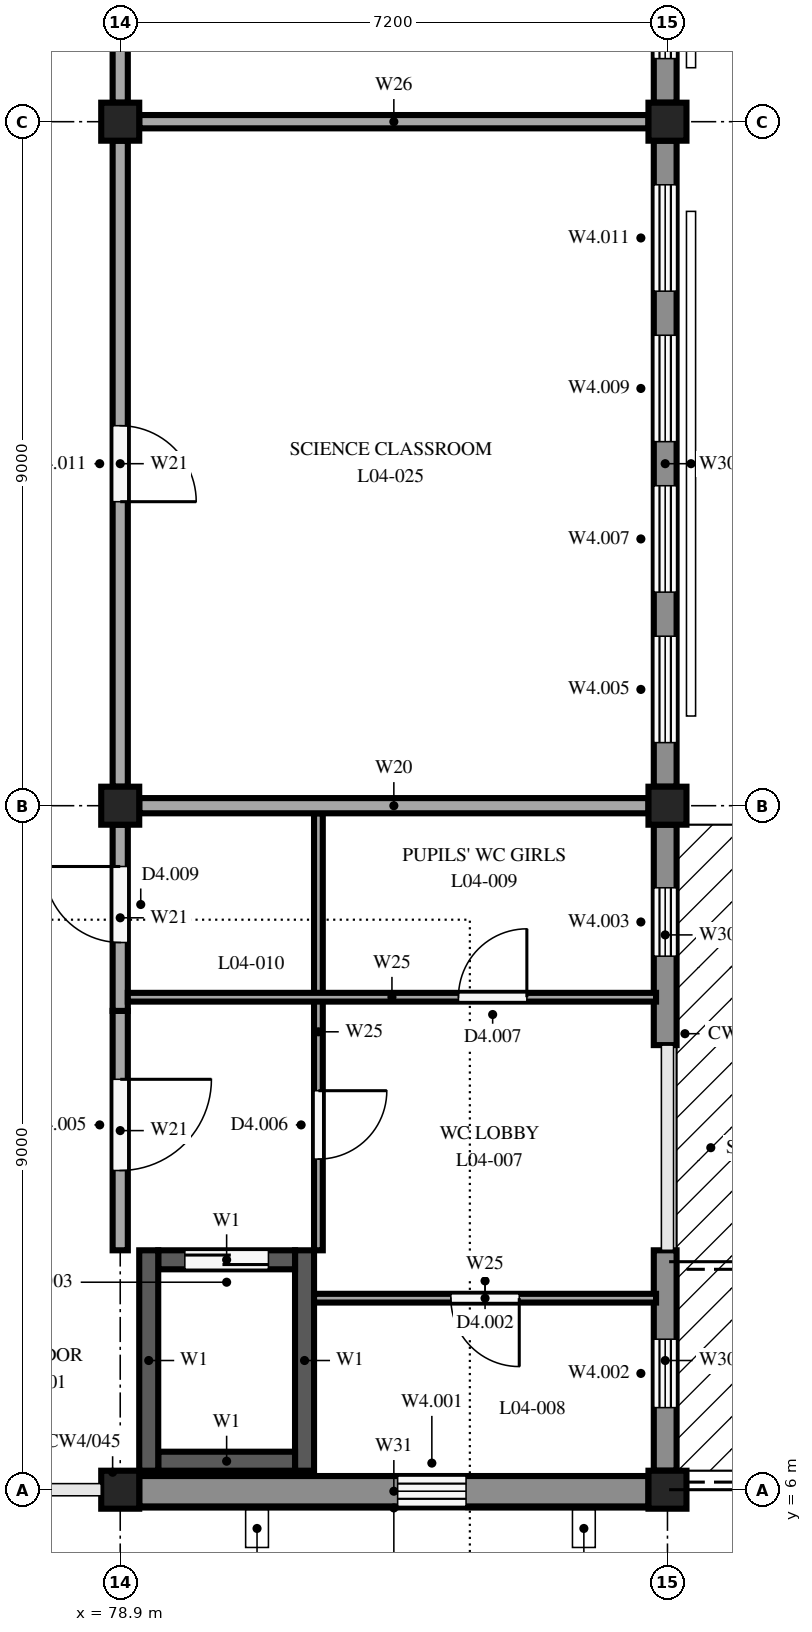
"""IFC4 building model, lengths in metres.
Left out: names, types, materials, properties, quantities, classifications, styles, units other than length and angle.
Written with IfcOpenShell. Run it as: python <this file> out.ifc"""

import sys

from ifc_helpers import new_model, si_unit, direction, frame, frame_2d, origin, origin_2d, place, context, subcontext, project, spatial, rectangle, extrude, element, fill, save


model = new_model("IFC4")
c1 = context("Model", 3, precision=1e-05, world=origin(), true_north=direction((0.0, 1.0)))
c2 = subcontext(c1, "Body", "Model", "MODEL_VIEW")
j1 = project(units=[si_unit("LENGTHUNIT", "METRE"), si_unit("PLANEANGLEUNIT", "RADIAN")], contexts=[c1])
p1 = place(None, origin())
s1 = spatial("IfcSite", under=j1, at=p1, CompositionType="ELEMENT")
p2 = place(p1, origin())
s2 = spatial("IfcBuilding", under=s1, at=p2, CompositionType="ELEMENT")
p3 = place(p2, frame((0.0, 0.0, 15.3)))
s3 = spatial("IfcBuildingStorey", under=s2, at=p3, CompositionType="ELEMENT", Elevation=15.3)
for number, where, z_axis, x_axis in (
    (1, (78.9, 6.0, 0.0), (0.0, 0.0, 1.0), (1.0, 0.0, 0.0)),
    (2, (78.9, 15.0, 0.0), (0.0, 0.0, 1.0), (1.0, 0.0, 0.0)),
    (3, (78.9, 24.0, 0.0), (0.0, 0.0, 1.0), (1.0, 0.0, 0.0)),
    (4, (86.1, 6.0, 0.0), (0.0, 0.0, 1.0), (1.0, 0.0, 0.0)),
    (5, (86.1, 15.0, 0.0), (0.0, 0.0, 1.0), (1.0, 0.0, 0.0)),
    (6, (86.1, 24.0, 0.0), (0.0, 0.0, 1.0), (1.0, 0.0, 0.0)),
):
    element("IfcColumn", number, at=place(p3, frame(where, z_axis=z_axis, x_axis=x_axis)), inside=s3, PredefinedType="COLUMN", context=c2, shape_type="SweptSolid", body=[
        extrude(rectangle(XDim=0.5, YDim=0.5, at=origin_2d()), origin(), (0.0, 0.0, 1.0), 3.3),
    ])
for number, where, z_axis, x_axis in (
    (7, (79.275, 6.25, 0.0), (0.0, 0.0, 1.0), (0.0, 1.0, 0.0)),
    (8, (81.325, 6.25, 0.0), (0.0, 0.0, 1.0), (0.0, 1.0, 0.0)),
):
    element("IfcWall", number, at=place(p3, frame(where, z_axis=z_axis, x_axis=x_axis)), inside=s3, PredefinedType="SHEAR", context=c2, shape_type="SweptSolid", body=[
        extrude(rectangle(XDim=2.9, YDim=0.25, at=frame_2d((1.45, 0.0))), origin(), (0.0, 0.0, 1.0), 3.3),
    ])
p4 = place(p3, frame((79.4, 6.375, 0.0), z_axis=(0.0, 0.0, 1.0), x_axis=(1.0, 0.0, 0.0)))
e9 = element("IfcWall", 9, at=p4, inside=s3, PredefinedType="SHEAR", context=c2, shape_type="SweptSolid", body=[
    extrude(rectangle(XDim=1.8, YDim=0.25, at=frame_2d((0.9, 0.0))), origin(), (0.0, 0.0, 1.0), 3.3),
])
p5 = place(p3, frame((79.4, 9.025, 0.0), z_axis=(0.0, 0.0, 1.0), x_axis=(1.0, 0.0, 0.0)))
e10 = element("IfcWall", 10, at=p5, inside=s3, PredefinedType="SHEAR", context=c2, shape_type="SweptSolid", body=[
    extrude(rectangle(XDim=1.8, YDim=0.25, at=frame_2d((0.9, 0.0))), origin(), (0.0, 0.0, 1.0), 3.3),
])
p6 = place(p5, frame((0.35, 0.0, 0.0)))
e11 = element("IfcOpeningElement", 11, at=p6, cuts=e10, PredefinedType="OPENING", context=c2, shape_type="SweptSolid", body=[
    extrude(rectangle(XDim=1.1, YDim=2.1, at=frame_2d((0.55, 1.05))), frame((0.0, 0.135, 0.0), z_axis=(0.0, -1.0, 0.0), x_axis=(1.0, 0.0, 0.0)), (0.0, 0.0, 1.0), 0.27),
])
p7 = place(p3, frame((86.07, 9.15, 0.0), z_axis=(0.0, 0.0, 1.0), x_axis=(0.0, -1.0, 0.0)))
e12 = element("IfcWall", 12, at=p7, inside=s3, PredefinedType="STANDARD", context=c2, shape_type="SweptSolid", body=[
    extrude(rectangle(XDim=2.9, YDim=0.3, at=frame_2d((1.45, 0.0))), origin(), (0.0, 0.0, 1.0), 2.75),
])
p8 = place(p7, frame((1.17, 0.0, 1.6)))
e13 = element("IfcOpeningElement", 13, at=p8, cuts=e12, PredefinedType="OPENING", context=c2, shape_type="SweptSolid", body=[
    extrude(rectangle(XDim=0.9, YDim=1.0, at=frame_2d((0.45, 0.5))), frame((0.0, 0.16, 0.0), z_axis=(0.0, -1.0, 0.0), x_axis=(1.0, 0.0, 0.0)), (0.0, 0.0, 1.0), 0.32),
])
p9 = place(p3, frame((86.07, 14.75, 0.0), z_axis=(0.0, 0.0, 1.0), x_axis=(0.0, -1.0, 0.0)))
e14 = element("IfcWall", 14, at=p9, inside=s3, PredefinedType="STANDARD", context=c2, shape_type="SweptSolid", body=[
    extrude(rectangle(XDim=2.9, YDim=0.3, at=frame_2d((1.45, 0.0))), origin(), (0.0, 0.0, 1.0), 2.75),
])
p10 = place(p9, frame((0.83, 0.0, 1.6)))
e15 = element("IfcOpeningElement", 15, at=p10, cuts=e14, PredefinedType="OPENING", context=c2, shape_type="SweptSolid", body=[
    extrude(rectangle(XDim=0.9, YDim=1.0, at=frame_2d((0.45, 0.5))), frame((0.0, 0.16, 0.0), z_axis=(0.0, -1.0, 0.0), x_axis=(1.0, 0.0, 0.0)), (0.0, 0.0, 1.0), 0.32),
])
p11 = place(p3, frame((86.07, 23.75, 0.0), z_axis=(0.0, 0.0, 1.0), x_axis=(0.0, -1.0, 0.0)))
e16 = element("IfcWall", 16, at=p11, inside=s3, PredefinedType="STANDARD", context=c2, shape_type="SweptSolid", body=[
    extrude(rectangle(XDim=8.5, YDim=0.3, at=frame_2d((4.25, 0.0))), origin(), (0.0, 0.0, 1.0), 2.75),
])
p12 = place(p11, frame((6.52, 0.0, 0.6)))
e17 = element("IfcOpeningElement", 17, at=p12, cuts=e16, PredefinedType="OPENING", context=c2, shape_type="SweptSolid", body=[
    extrude(rectangle(XDim=1.4, YDim=2.1, at=frame_2d((0.7, 1.05))), frame((0.0, 0.16, 0.0), z_axis=(0.0, -1.0, 0.0), x_axis=(1.0, 0.0, 0.0)), (0.0, 0.0, 1.0), 0.32),
])
p13 = place(p11, frame((4.54, 0.0, 0.6)))
e18 = element("IfcOpeningElement", 18, at=p13, cuts=e16, PredefinedType="OPENING", context=c2, shape_type="SweptSolid", body=[
    extrude(rectangle(XDim=1.4, YDim=2.1, at=frame_2d((0.7, 1.05))), frame((0.0, 0.16, 0.0), z_axis=(0.0, -1.0, 0.0), x_axis=(1.0, 0.0, 0.0)), (0.0, 0.0, 1.0), 0.32),
])
p14 = place(p11, frame((2.56, 0.0, 0.6)))
e19 = element("IfcOpeningElement", 19, at=p14, cuts=e16, PredefinedType="OPENING", context=c2, shape_type="SweptSolid", body=[
    extrude(rectangle(XDim=1.4, YDim=2.1, at=frame_2d((0.7, 1.05))), frame((0.0, 0.16, 0.0), z_axis=(0.0, -1.0, 0.0), x_axis=(1.0, 0.0, 0.0)), (0.0, 0.0, 1.0), 0.32),
])
p15 = place(p11, frame((0.58, 0.0, 0.6)))
e20 = element("IfcOpeningElement", 20, at=p15, cuts=e16, PredefinedType="OPENING", context=c2, shape_type="SweptSolid", body=[
    extrude(rectangle(XDim=1.4, YDim=2.1, at=frame_2d((0.7, 1.05))), frame((0.0, 0.16, 0.0), z_axis=(0.0, -1.0, 0.0), x_axis=(1.0, 0.0, 0.0)), (0.0, 0.0, 1.0), 0.32),
])
p16 = place(p3, frame((86.07, 32.75, 0.0), z_axis=(0.0, 0.0, 1.0), x_axis=(0.0, -1.0, 0.0)))
e21 = element("IfcWall", 21, at=p16, inside=s3, PredefinedType="STANDARD", context=c2, shape_type="SweptSolid", body=[
    extrude(rectangle(XDim=8.5, YDim=0.3, at=frame_2d((4.25, 0.0))), origin(), (0.0, 0.0, 1.0), 2.75),
])
p17 = place(p16, frame((6.52, 0.0, 0.6)))
e22 = element("IfcOpeningElement", 22, at=p17, cuts=e21, PredefinedType="OPENING", context=c2, shape_type="SweptSolid", body=[
    extrude(rectangle(XDim=1.4, YDim=2.1, at=frame_2d((0.7, 1.05))), frame((0.0, 0.16, 0.0), z_axis=(0.0, -1.0, 0.0), x_axis=(1.0, 0.0, 0.0)), (0.0, 0.0, 1.0), 0.32),
])
p18 = place(p16, frame((4.54, 0.0, 0.6)))
e23 = element("IfcOpeningElement", 23, at=p18, cuts=e21, PredefinedType="OPENING", context=c2, shape_type="SweptSolid", body=[
    extrude(rectangle(XDim=1.4, YDim=2.1, at=frame_2d((0.7, 1.05))), frame((0.0, 0.16, 0.0), z_axis=(0.0, -1.0, 0.0), x_axis=(1.0, 0.0, 0.0)), (0.0, 0.0, 1.0), 0.32),
])
p19 = place(p16, frame((2.56, 0.0, 0.6)))
e24 = element("IfcOpeningElement", 24, at=p19, cuts=e21, PredefinedType="OPENING", context=c2, shape_type="SweptSolid", body=[
    extrude(rectangle(XDim=1.4, YDim=2.1, at=frame_2d((0.7, 1.05))), frame((0.0, 0.16, 0.0), z_axis=(0.0, -1.0, 0.0), x_axis=(1.0, 0.0, 0.0)), (0.0, 0.0, 1.0), 0.32),
])
p20 = place(p16, frame((0.58, 0.0, 0.6)))
e25 = element("IfcOpeningElement", 25, at=p20, cuts=e21, PredefinedType="OPENING", context=c2, shape_type="SweptSolid", body=[
    extrude(rectangle(XDim=1.4, YDim=2.1, at=frame_2d((0.7, 1.05))), frame((0.0, 0.16, 0.0), z_axis=(0.0, -1.0, 0.0), x_axis=(1.0, 0.0, 0.0)), (0.0, 0.0, 1.0), 0.32),
])
p21 = place(p3, frame((85.85, 5.98, 0.0), z_axis=(0.0, 0.0, 1.0), x_axis=(-1.0, 0.0, 0.0)))
e26 = element("IfcWall", 26, at=p21, inside=s3, PredefinedType="STANDARD", context=c2, shape_type="SweptSolid", body=[
    extrude(rectangle(XDim=6.7, YDim=0.4, at=frame_2d((3.35, 0.0))), origin(), (0.0, 0.0, 1.0), 2.8),
])
p22 = place(p21, frame((2.4, 0.0, 1.6)))
e27 = element("IfcOpeningElement", 27, at=p22, cuts=e26, PredefinedType="OPENING", context=c2, shape_type="SweptSolid", body=[
    extrude(rectangle(XDim=0.9, YDim=1.0, at=frame_2d((0.45, 0.5))), frame((0.0, 0.21, 0.0), z_axis=(0.0, -1.0, 0.0), x_axis=(1.0, 0.0, 0.0)), (0.0, 0.0, 1.0), 0.42),
])
p23 = place(p3, frame((78.9, 12.3, 0.0), z_axis=(0.0, 0.0, 1.0), x_axis=(0.0, -1.0, 0.0)))
e28 = element("IfcWall", 28, at=p23, inside=s3, PredefinedType="PARTITIONING", context=c2, shape_type="SweptSolid", body=[
    extrude(rectangle(XDim=3.15, YDim=0.2, at=frame_2d((1.575, 0.0))), origin(), (0.0, 0.0, 1.0), 2.8),
])
p24 = place(p23, frame((0.9, 0.0, 0.0)))
e29 = element("IfcOpeningElement", 29, at=p24, cuts=e28, PredefinedType="OPENING", context=c2, shape_type="SweptSolid", body=[
    extrude(rectangle(XDim=1.2, YDim=2.1, at=frame_2d((0.6, 1.05))), frame((0.0, 0.11, 0.0), z_axis=(0.0, -1.0, 0.0), x_axis=(1.0, 0.0, 0.0)), (0.0, 0.0, 1.0), 0.22),
])
p25 = place(p3, frame((78.9, 12.3, 0.0), z_axis=(0.0, 0.0, 1.0), x_axis=(0.0, 1.0, 0.0)))
e30 = element("IfcWall", 30, at=p25, inside=s3, PredefinedType="PARTITIONING", context=c2, shape_type="SweptSolid", body=[
    extrude(rectangle(XDim=2.45, YDim=0.2, at=frame_2d((1.225, 0.0))), origin(), (0.0, 0.0, 1.0), 2.8),
])
p26 = place(p25, frame((0.9, 0.0, 0.0)))
e31 = element("IfcOpeningElement", 31, at=p26, cuts=e30, PredefinedType="OPENING", context=c2, shape_type="SweptSolid", body=[
    extrude(rectangle(XDim=1.0, YDim=2.1, at=frame_2d((0.5, 1.05))), frame((0.0, 0.11, 0.0), z_axis=(0.0, -1.0, 0.0), x_axis=(1.0, 0.0, 0.0)), (0.0, 0.0, 1.0), 0.22),
])
p27 = place(p3, frame((79.15, 15.0, 0.0), z_axis=(0.0, 0.0, 1.0), x_axis=(1.0, 0.0, 0.0)))
e32 = element("IfcWall", 32, at=p27, inside=s3, PredefinedType="PARTITIONING", context=c2, shape_type="SweptSolid", body=[
    extrude(rectangle(XDim=6.7, YDim=0.2, at=frame_2d((3.35, 0.0))), origin(), (0.0, 0.0, 1.0), 2.8),
])
p28 = place(p3, frame((81.508, 14.9, 0.0), z_axis=(0.0, 0.0, 1.0), x_axis=(0.0, -1.0, 0.0)))
e33 = element("IfcWall", 33, at=p28, inside=s3, PredefinedType="PARTITIONING", context=c2, shape_type="SweptSolid", body=[
    extrude(rectangle(XDim=5.75, YDim=0.115, at=frame_2d((2.875, 0.0))), origin(), (0.0, 0.0, 1.0), 3.3),
])
p29 = place(p28, frame((3.65, 0.0, 0.0)))
e34 = element("IfcOpeningElement", 34, at=p29, cuts=e33, PredefinedType="OPENING", context=c2, shape_type="SweptSolid", body=[
    extrude(rectangle(XDim=0.9, YDim=2.1, at=frame_2d((0.45, 1.05))), frame((0.0, 0.067, 0.0), z_axis=(0.0, -1.0, 0.0), x_axis=(1.0, 0.0, 0.0)), (0.0, 0.0, 1.0), 0.135),
])
p30 = place(p3, frame((85.95, 8.52, 0.0), z_axis=(0.0, 0.0, 1.0), x_axis=(-1.0, 0.0, 0.0)))
e35 = element("IfcWall", 35, at=p30, inside=s3, PredefinedType="PARTITIONING", context=c2, shape_type="SweptSolid", body=[
    extrude(rectangle(XDim=4.5, YDim=0.115, at=frame_2d((2.25, 0.0))), origin(), (0.0, 0.0, 1.0), 3.3),
])
p31 = place(p30, frame((1.8, 0.0, 0.0)))
e36 = element("IfcOpeningElement", 36, at=p31, cuts=e35, PredefinedType="OPENING", context=c2, shape_type="SweptSolid", body=[
    extrude(rectangle(XDim=0.9, YDim=2.1, at=frame_2d((0.45, 1.05))), frame((0.0, 0.067, 0.0), z_axis=(0.0, -1.0, 0.0), x_axis=(1.0, 0.0, 0.0)), (0.0, 0.0, 1.0), 0.135),
])
p32 = place(p3, frame((79.0, 12.48, 0.0), z_axis=(0.0, 0.0, 1.0), x_axis=(1.0, 0.0, 0.0)))
e37 = element("IfcWall", 37, at=p32, inside=s3, PredefinedType="PARTITIONING", context=c2, shape_type="SweptSolid", body=[
    extrude(rectangle(XDim=6.95, YDim=0.115, at=frame_2d((3.475, 0.0))), origin(), (0.0, 0.0, 1.0), 3.3),
])
p33 = place(p32, frame((4.35, 0.0, 0.0)))
e38 = element("IfcOpeningElement", 38, at=p33, cuts=e37, PredefinedType="OPENING", context=c2, shape_type="SweptSolid", body=[
    extrude(rectangle(XDim=0.9, YDim=2.1, at=frame_2d((0.45, 1.05))), frame((0.0, 0.067, 0.0), z_axis=(0.0, -1.0, 0.0), x_axis=(1.0, 0.0, 0.0)), (0.0, 0.0, 1.0), 0.135),
])
p34 = place(p3, frame((78.9, 23.75, 0.0), z_axis=(0.0, 0.0, 1.0), x_axis=(0.0, -1.0, 0.0)))
e39 = element("IfcWall", 39, at=p34, inside=s3, PredefinedType="PARTITIONING", context=c2, shape_type="SweptSolid", body=[
    extrude(rectangle(XDim=8.5, YDim=0.2, at=frame_2d((4.25, 0.0))), origin(), (0.0, 0.0, 1.0), 2.8),
])
p35 = place(p34, frame((3.75, 0.0, 0.0)))
e40 = element("IfcOpeningElement", 40, at=p35, cuts=e39, PredefinedType="OPENING", context=c2, shape_type="SweptSolid", body=[
    extrude(rectangle(XDim=1.0, YDim=2.1, at=frame_2d((0.5, 1.05))), frame((0.0, 0.11, 0.0), z_axis=(0.0, -1.0, 0.0), x_axis=(1.0, 0.0, 0.0)), (0.0, 0.0, 1.0), 0.22),
])
p36 = place(p3, frame((78.9, 32.75, 0.0), z_axis=(0.0, 0.0, 1.0), x_axis=(0.0, -1.0, 0.0)))
e41 = element("IfcWall", 41, at=p36, inside=s3, PredefinedType="PARTITIONING", context=c2, shape_type="SweptSolid", body=[
    extrude(rectangle(XDim=8.5, YDim=0.2, at=frame_2d((4.25, 0.0))), origin(), (0.0, 0.0, 1.0), 2.8),
])
p37 = place(p36, frame((5.919, 0.0, 0.0)))
e42 = element("IfcOpeningElement", 42, at=p37, cuts=e41, PredefinedType="OPENING", context=c2, shape_type="SweptSolid", body=[
    extrude(rectangle(XDim=1.0, YDim=2.1, at=frame_2d((0.5, 1.05))), frame((0.0, 0.11, 0.0), z_axis=(0.0, -1.0, 0.0), x_axis=(1.0, 0.0, 0.0)), (0.0, 0.0, 1.0), 0.22),
])
p38 = place(p36, frame((1.581, 0.0, 0.0)))
e43 = element("IfcOpeningElement", 43, at=p38, cuts=e41, PredefinedType="OPENING", context=c2, shape_type="SweptSolid", body=[
    extrude(rectangle(XDim=1.0, YDim=2.1, at=frame_2d((0.5, 1.05))), frame((0.0, 0.11, 0.0), z_axis=(0.0, -1.0, 0.0), x_axis=(1.0, 0.0, 0.0)), (0.0, 0.0, 1.0), 0.22),
])
p39 = place(p3, frame((79.15, 24.0, 0.0), z_axis=(0.0, 0.0, 1.0), x_axis=(1.0, 0.0, 0.0)))
e44 = element("IfcWall", 44, at=p39, inside=s3, PredefinedType="PARTITIONING", context=c2, shape_type="SweptSolid", body=[
    extrude(rectangle(XDim=6.7, YDim=0.175, at=frame_2d((3.35, 0.0))), origin(), (0.0, 0.0, 1.0), 2.8),
])
p40 = place(p8, origin())
e45 = element("IfcWindow", 45, at=p40, inside=s3, PartitioningType="SINGLE_PANEL", PredefinedType="WINDOW", context=c2, shape_type="SweptSolid", body=[
    extrude(rectangle(XDim=0.9, YDim=1.0, at=frame_2d((0.45, 0.5))), frame((0.0, 0.03, 0.0), z_axis=(0.0, -1.0, 0.0), x_axis=(1.0, 0.0, 0.0)), (0.0, 0.0, 1.0), 0.06),
])
fill(e13, e45)
p41 = place(p10, origin())
e46 = element("IfcWindow", 46, at=p41, inside=s3, PartitioningType="SINGLE_PANEL", PredefinedType="WINDOW", context=c2, shape_type="SweptSolid", body=[
    extrude(rectangle(XDim=0.9, YDim=1.0, at=frame_2d((0.45, 0.5))), frame((0.0, 0.03, 0.0), z_axis=(0.0, -1.0, 0.0), x_axis=(1.0, 0.0, 0.0)), (0.0, 0.0, 1.0), 0.06),
])
fill(e15, e46)
p42 = place(p12, origin())
e47 = element("IfcWindow", 47, at=p42, inside=s3, PartitioningType="DOUBLE_PANEL_VERTICAL", PredefinedType="WINDOW", context=c2, shape_type="SweptSolid", body=[
    extrude(rectangle(XDim=1.4, YDim=2.1, at=frame_2d((0.7, 1.05))), frame((0.0, 0.03, 0.0), z_axis=(0.0, -1.0, 0.0), x_axis=(1.0, 0.0, 0.0)), (0.0, 0.0, 1.0), 0.06),
])
fill(e17, e47)
p43 = place(p13, origin())
e48 = element("IfcWindow", 48, at=p43, inside=s3, PartitioningType="DOUBLE_PANEL_VERTICAL", PredefinedType="WINDOW", context=c2, shape_type="SweptSolid", body=[
    extrude(rectangle(XDim=1.4, YDim=2.1, at=frame_2d((0.7, 1.05))), frame((0.0, 0.03, 0.0), z_axis=(0.0, -1.0, 0.0), x_axis=(1.0, 0.0, 0.0)), (0.0, 0.0, 1.0), 0.06),
])
fill(e18, e48)
p44 = place(p14, origin())
e49 = element("IfcWindow", 49, at=p44, inside=s3, PartitioningType="DOUBLE_PANEL_VERTICAL", PredefinedType="WINDOW", context=c2, shape_type="SweptSolid", body=[
    extrude(rectangle(XDim=1.4, YDim=2.1, at=frame_2d((0.7, 1.05))), frame((0.0, 0.03, 0.0), z_axis=(0.0, -1.0, 0.0), x_axis=(1.0, 0.0, 0.0)), (0.0, 0.0, 1.0), 0.06),
])
fill(e19, e49)
p45 = place(p15, origin())
e50 = element("IfcWindow", 50, at=p45, inside=s3, PartitioningType="DOUBLE_PANEL_VERTICAL", PredefinedType="WINDOW", context=c2, shape_type="SweptSolid", body=[
    extrude(rectangle(XDim=1.4, YDim=2.1, at=frame_2d((0.7, 1.05))), frame((0.0, 0.03, 0.0), z_axis=(0.0, -1.0, 0.0), x_axis=(1.0, 0.0, 0.0)), (0.0, 0.0, 1.0), 0.06),
])
fill(e20, e50)
p46 = place(p17, origin())
e51 = element("IfcWindow", 51, at=p46, inside=s3, PartitioningType="DOUBLE_PANEL_VERTICAL", PredefinedType="WINDOW", context=c2, shape_type="SweptSolid", body=[
    extrude(rectangle(XDim=1.4, YDim=2.1, at=frame_2d((0.7, 1.05))), frame((0.0, 0.03, 0.0), z_axis=(0.0, -1.0, 0.0), x_axis=(1.0, 0.0, 0.0)), (0.0, 0.0, 1.0), 0.06),
])
fill(e22, e51)
p47 = place(p22, origin())
e52 = element("IfcWindow", 52, at=p47, inside=s3, PartitioningType="SINGLE_PANEL", PredefinedType="WINDOW", context=c2, shape_type="SweptSolid", body=[
    extrude(rectangle(XDim=0.9, YDim=1.0, at=frame_2d((0.45, 0.5))), frame((0.0, 0.03, 0.0), z_axis=(0.0, -1.0, 0.0), x_axis=(1.0, 0.0, 0.0)), (0.0, 0.0, 1.0), 0.06),
])
fill(e27, e52)
p48 = place(p24, origin())
e53 = element("IfcDoor", 53, at=p48, inside=s3, OperationType="SINGLE_SWING_LEFT", PredefinedType="DOOR", context=c2, shape_type="SweptSolid", body=[
    extrude(rectangle(XDim=1.2, YDim=2.1, at=frame_2d((0.6, 1.05))), frame((0.0, 0.025, 0.0), z_axis=(0.0, -1.0, 0.0), x_axis=(1.0, 0.0, 0.0)), (0.0, 0.0, 1.0), 0.05),
])
fill(e29, e53)
p49 = place(p26, origin())
e54 = element("IfcDoor", 54, at=p49, inside=s3, OperationType="SINGLE_SWING_RIGHT", PredefinedType="DOOR", context=c2, shape_type="SweptSolid", body=[
    extrude(rectangle(XDim=1.0, YDim=2.1, at=frame_2d((0.5, 1.05))), frame((0.0, 0.025, 0.0), z_axis=(0.0, -1.0, 0.0), x_axis=(1.0, 0.0, 0.0)), (0.0, 0.0, 1.0), 0.05),
])
fill(e31, e54)
p50 = place(p29, origin())
e55 = element("IfcDoor", 55, at=p50, inside=s3, OperationType="SINGLE_SWING_LEFT", PredefinedType="DOOR", context=c2, shape_type="SweptSolid", body=[
    extrude(rectangle(XDim=0.9, YDim=2.1, at=frame_2d((0.45, 1.05))), frame((0.0, 0.025, 0.0), z_axis=(0.0, -1.0, 0.0), x_axis=(1.0, 0.0, 0.0)), (0.0, 0.0, 1.0), 0.05),
])
fill(e34, e55)
p51 = place(p31, origin())
e56 = element("IfcDoor", 56, at=p51, inside=s3, OperationType="SINGLE_SWING_LEFT", PredefinedType="DOOR", context=c2, shape_type="SweptSolid", body=[
    extrude(rectangle(XDim=0.9, YDim=2.1, at=frame_2d((0.45, 1.05))), frame((0.0, 0.025, 0.0), z_axis=(0.0, -1.0, 0.0), x_axis=(1.0, 0.0, 0.0)), (0.0, 0.0, 1.0), 0.05),
])
fill(e36, e56)
p52 = place(p33, origin())
e57 = element("IfcDoor", 57, at=p52, inside=s3, OperationType="SINGLE_SWING_RIGHT", PredefinedType="DOOR", context=c2, shape_type="SweptSolid", body=[
    extrude(rectangle(XDim=0.9, YDim=2.1, at=frame_2d((0.45, 1.05))), frame((0.0, 0.025, 0.0), z_axis=(0.0, -1.0, 0.0), x_axis=(1.0, 0.0, 0.0)), (0.0, 0.0, 1.0), 0.05),
])
fill(e38, e57)
p53 = place(p35, origin())
e58 = element("IfcDoor", 58, at=p53, inside=s3, OperationType="SINGLE_SWING_RIGHT", PredefinedType="DOOR", context=c2, shape_type="SweptSolid", body=[
    extrude(rectangle(XDim=1.0, YDim=2.1, at=frame_2d((0.5, 1.05))), frame((0.0, 0.025, 0.0), z_axis=(0.0, -1.0, 0.0), x_axis=(1.0, 0.0, 0.0)), (0.0, 0.0, 1.0), 0.05),
])
fill(e40, e58)
p54 = place(p6, origin())
e59 = element("IfcDoor", 59, at=p54, inside=s3, OperationType="SLIDING_TO_LEFT", PredefinedType="DOOR", context=c2, shape_type="SweptSolid", body=[
    extrude(rectangle(XDim=1.1, YDim=2.1, at=frame_2d((0.55, 1.05))), frame((0.0, 0.025, 0.0), z_axis=(0.0, -1.0, 0.0), x_axis=(1.0, 0.0, 0.0)), (0.0, 0.0, 1.0), 0.05),
])
fill(e11, e59)
save(model, sys.argv[1])
